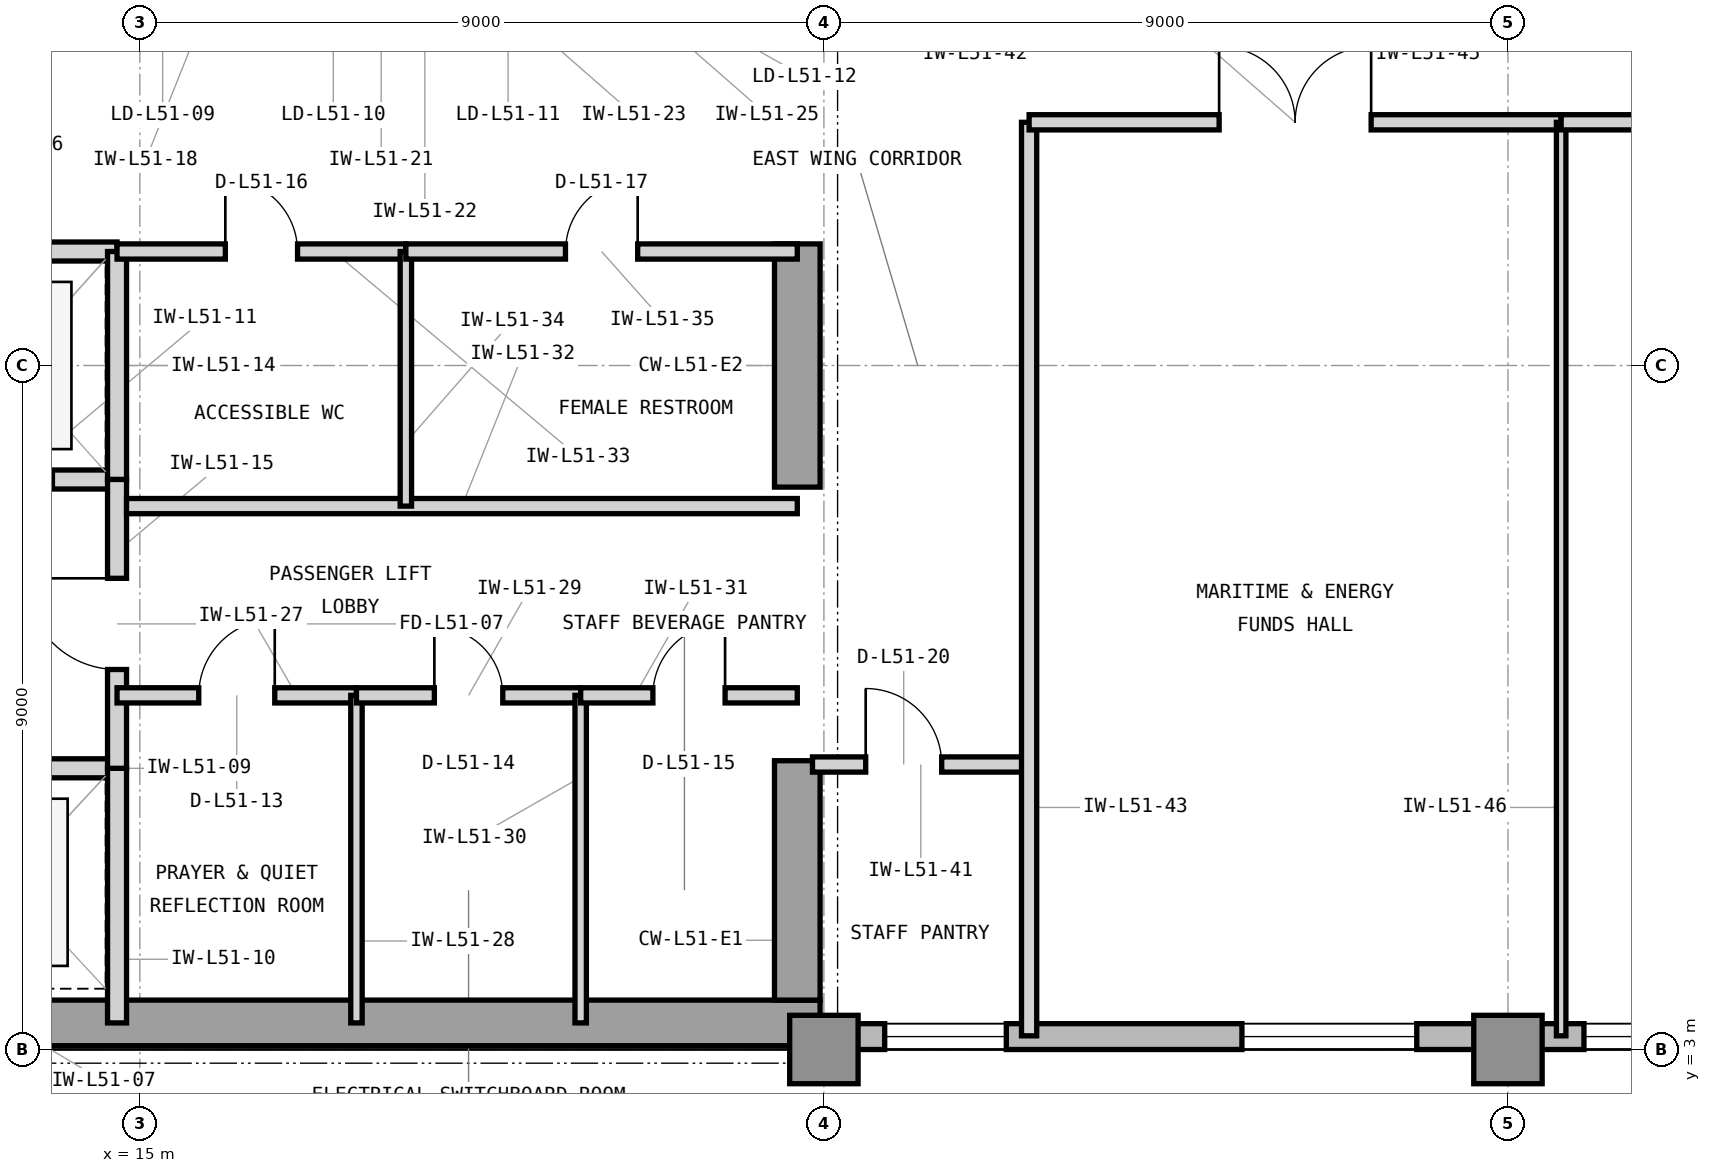
"""IFC4 building model, lengths in metres.
Left out: names, types, materials, properties, quantities, classifications, styles, units other than length and angle.
Written with IfcOpenShell. Run it as: python <this file> out.ifc"""

import sys

from ifc_helpers import new_model, si_unit, direction, frame, frame_2d, origin, origin_2d, place, context, subcontext, project, spatial, rectangle, extrude, element, fill, save


model = new_model("IFC4")
c1 = context("Model", 3, precision=1e-05, world=origin(), true_north=direction((0.0, 1.0)))
c2 = subcontext(c1, "Body", "Model", "MODEL_VIEW")
j1 = project(units=[si_unit("LENGTHUNIT", "METRE"), si_unit("PLANEANGLEUNIT", "RADIAN")], contexts=[c1])
p1 = place(None, origin())
s1 = spatial("IfcSite", under=j1, at=p1, CompositionType="ELEMENT")
p2 = place(p1, origin())
s2 = spatial("IfcBuilding", under=s1, at=p2, CompositionType="ELEMENT")
p3 = place(p2, frame((0.0, 0.0, 211.2)))
s3 = spatial("IfcBuildingStorey", under=s2, at=p3, CompositionType="ELEMENT", Elevation=211.2)
p4 = place(p3, frame((7.475, 3.35, 0.0), z_axis=(0.0, 0.0, 1.0), x_axis=(1.0, 0.0, 0.0)))
e1 = element("IfcWall", 1, at=p4, inside=s3, PredefinedType="SHEAR", context=c2, shape_type="SweptSolid", body=[
    extrude(rectangle(XDim=16.475, YDim=0.6, at=frame_2d((8.237, 0.0))), origin(), (0.0, 0.0, 1.0), 3.9),
])
p5 = place(p3, frame((23.65, 3.65, 0.0), z_axis=(0.0, 0.0, 1.0), x_axis=(0.0, 1.0, 0.0)))
e2 = element("IfcWall", 2, at=p5, inside=s3, PredefinedType="SHEAR", context=c2, shape_type="SweptSolid", body=[
    extrude(rectangle(XDim=3.15, YDim=0.6, at=frame_2d((1.575, 0.0))), origin(), (0.0, 0.0, 1.0), 3.9),
])
p6 = place(p3, frame((23.65, 10.4, 0.0), z_axis=(0.0, 0.0, 1.0), x_axis=(0.0, 1.0, 0.0)))
e3 = element("IfcWall", 3, at=p6, inside=s3, PredefinedType="SHEAR", context=c2, shape_type="SweptSolid", body=[
    extrude(rectangle(XDim=3.2, YDim=0.6, at=frame_2d((1.6, 0.0))), origin(), (0.0, 0.0, 1.0), 3.9),
])
for number, where, z_axis, x_axis in (
    (4, (24.0, 3.0, 0.0), (0.0, 0.0, 1.0), (1.0, 0.0, 0.0)),
    (5, (33.0, 3.0, 0.0), (0.0, 0.0, 1.0), (1.0, 0.0, 0.0)),
):
    element("IfcColumn", number, at=place(p3, frame(where, z_axis=z_axis, x_axis=x_axis)), inside=s3, PredefinedType="COLUMN", context=c2, shape_type="SweptSolid", body=[
        extrude(rectangle(XDim=0.9, YDim=0.9, at=origin_2d()), origin(), (0.0, 0.0, 1.0), 3.9),
    ])
p7 = place(p3, frame((23.9, 3.17, 0.0), z_axis=(0.0, 0.0, 1.0), x_axis=(1.0, 0.0, 0.0)))
e6 = element("IfcWall", 6, at=p7, inside=s3, PredefinedType="STANDARD", context=c2, shape_type="SweptSolid", body=[
    extrude(rectangle(XDim=31.5, YDim=0.34, at=frame_2d((15.75, 0.0))), origin(), (0.0, 0.0, 1.0), 3.7),
])
p8 = place(p7, frame((5.6, 0.0, 0.9)))
e7 = element("IfcOpeningElement", 7, at=p8, cuts=e6, PredefinedType="OPENING", context=c2, shape_type="SweptSolid", body=[
    extrude(rectangle(XDim=2.3, YDim=2.2, at=frame_2d((1.15, 1.1))), frame((0.0, 0.18, 0.0), z_axis=(0.0, -1.0, 0.0), x_axis=(1.0, 0.0, 0.0)), (0.0, 0.0, 1.0), 0.36),
])
p9 = place(p7, frame((10.1, 0.0, 0.9)))
e8 = element("IfcOpeningElement", 8, at=p9, cuts=e6, PredefinedType="OPENING", context=c2, shape_type="SweptSolid", body=[
    extrude(rectangle(XDim=2.3, YDim=2.2, at=frame_2d((1.15, 1.1))), frame((0.0, 0.18, 0.0), z_axis=(0.0, -1.0, 0.0), x_axis=(1.0, 0.0, 0.0)), (0.0, 0.0, 1.0), 0.36),
])
p10 = place(p7, frame((19.1, 0.0, 0.9)))
e9 = element("IfcOpeningElement", 9, at=p10, cuts=e6, PredefinedType="OPENING", context=c2, shape_type="SweptSolid", body=[
    extrude(rectangle(XDim=2.3, YDim=2.2, at=frame_2d((1.15, 1.1))), frame((0.0, 0.18, 0.0), z_axis=(0.0, -1.0, 0.0), x_axis=(1.0, 0.0, 0.0)), (0.0, 0.0, 1.0), 0.36),
])
p11 = place(p7, frame((0.9, 0.0, 0.9)))
e10 = element("IfcOpeningElement", 10, at=p11, cuts=e6, PredefinedType="OPENING", context=c2, shape_type="SweptSolid", body=[
    extrude(rectangle(XDim=1.6, YDim=2.2, at=frame_2d((0.8, 1.1))), frame((0.0, 0.18, 0.0), z_axis=(0.0, -1.0, 0.0), x_axis=(1.0, 0.0, 0.0)), (0.0, 0.0, 1.0), 0.36),
])
p12 = place(p3, frame((11.82, 6.7, 0.0), z_axis=(0.0, 0.0, 1.0), x_axis=(1.0, 0.0, 0.0)))
e11 = element("IfcWall", 11, at=p12, inside=s3, PredefinedType="PARTITIONING", context=c2, shape_type="SweptSolid", body=[
    extrude(rectangle(XDim=2.88, YDim=0.25, at=frame_2d((1.44, 0.0))), origin(), (0.0, 0.0, 1.0), 3.283),
])
p13 = place(p12, frame((0.85, 0.0, 0.0)))
e12 = element("IfcOpeningElement", 12, at=p13, cuts=e11, PredefinedType="OPENING", context=c2, shape_type="SweptSolid", body=[
    extrude(rectangle(XDim=1.1, YDim=2.25, at=frame_2d((0.55, 1.125))), frame((0.0, 0.135, 0.0), z_axis=(0.0, -1.0, 0.0), x_axis=(1.0, 0.0, 0.0)), (0.0, 0.0, 1.0), 0.27),
])
p14 = place(p3, frame((14.7, 3.35, 0.0), z_axis=(0.0, 0.0, 1.0), x_axis=(0.0, 1.0, 0.0)))
e13 = element("IfcWall", 13, at=p14, inside=s3, PredefinedType="PARTITIONING", context=c2, shape_type="SweptSolid", body=[
    extrude(rectangle(XDim=3.35, YDim=0.25, at=frame_2d((1.675, 0.0))), origin(), (0.0, 0.0, 1.0), 3.69),
])
p15 = place(p3, frame((11.95, 10.5, 0.0), z_axis=(0.0, 0.0, 1.0), x_axis=(1.0, 0.0, 0.0)))
e14 = element("IfcWall", 14, at=p15, inside=s3, PredefinedType="PARTITIONING", context=c2, shape_type="SweptSolid", body=[
    extrude(rectangle(XDim=2.75, YDim=0.25, at=frame_2d((1.375, 0.0))), origin(), (0.0, 0.0, 1.0), 3.283),
])
p16 = place(p15, frame((0.8, 0.0, 0.0)))
e15 = element("IfcOpeningElement", 15, at=p16, cuts=e14, PredefinedType="OPENING", context=c2, shape_type="SweptSolid", body=[
    extrude(rectangle(XDim=1.1, YDim=2.25, at=frame_2d((0.55, 1.125))), frame((0.0, 0.135, 0.0), z_axis=(0.0, -1.0, 0.0), x_axis=(1.0, 0.0, 0.0)), (0.0, 0.0, 1.0), 0.27),
])
p17 = place(p3, frame((11.95, 13.5, 0.0), z_axis=(0.0, 0.0, 1.0), x_axis=(1.0, 0.0, 0.0)))
e16 = element("IfcWall", 16, at=p17, inside=s3, PredefinedType="PARTITIONING", context=c2, shape_type="SweptSolid", body=[
    extrude(rectangle(XDim=2.75, YDim=0.25, at=frame_2d((1.375, 0.0))), origin(), (0.0, 0.0, 1.0), 3.283),
])
p18 = place(p3, frame((14.7, 10.5, 0.0), z_axis=(0.0, 0.0, 1.0), x_axis=(0.0, 1.0, 0.0)))
e17 = element("IfcWall", 17, at=p18, inside=s3, PredefinedType="PARTITIONING", context=c2, shape_type="SweptSolid", body=[
    extrude(rectangle(XDim=3.0, YDim=0.25, at=frame_2d((1.5, 0.0))), origin(), (0.0, 0.0, 1.0), 3.69),
])
p19 = place(p3, frame((14.7, 6.7, 0.0), z_axis=(0.0, 0.0, 1.0), x_axis=(0.0, 1.0, 0.0)))
e18 = element("IfcWall", 18, at=p19, inside=s3, PredefinedType="PARTITIONING", context=c2, shape_type="SweptSolid", body=[
    extrude(rectangle(XDim=3.8, YDim=0.25, at=frame_2d((1.9, 0.0))), origin(), (0.0, 0.0, 1.0), 3.69),
])
p20 = place(p19, frame((1.3, 0.0, 0.0)))
e19 = element("IfcOpeningElement", 19, at=p20, cuts=e18, PredefinedType="OPENING", context=c2, shape_type="SweptSolid", body=[
    extrude(rectangle(XDim=1.2, YDim=2.2, at=frame_2d((0.6, 1.1))), frame((0.0, 0.135, 0.0), z_axis=(0.0, -1.0, 0.0), x_axis=(1.0, 0.0, 0.0)), (0.0, 0.0, 1.0), 0.27),
])
p21 = place(p3, frame((14.7, 7.66, 0.0), z_axis=(0.0, 0.0, 1.0), x_axis=(1.0, 0.0, 0.0)))
e20 = element("IfcWall", 20, at=p21, inside=s3, PredefinedType="PARTITIONING", context=c2, shape_type="SweptSolid", body=[
    extrude(rectangle(XDim=3.15, YDim=0.2, at=frame_2d((1.575, 0.0))), origin(), (0.0, 0.0, 1.0), 3.69),
])
p22 = place(p21, frame((1.075, 0.0, 0.0)))
e21 = element("IfcOpeningElement", 21, at=p22, cuts=e20, PredefinedType="OPENING", context=c2, shape_type="SweptSolid", body=[
    extrude(rectangle(XDim=1.0, YDim=2.15, at=frame_2d((0.5, 1.075))), frame((0.0, 0.11, 0.0), z_axis=(0.0, -1.0, 0.0), x_axis=(1.0, 0.0, 0.0)), (0.0, 0.0, 1.0), 0.22),
])
p23 = place(p3, frame((17.85, 3.35, 0.0), z_axis=(0.0, 0.0, 1.0), x_axis=(0.0, 1.0, 0.0)))
e22 = element("IfcWall", 22, at=p23, inside=s3, PredefinedType="PARTITIONING", context=c2, shape_type="SweptSolid", body=[
    extrude(rectangle(XDim=4.31, YDim=0.15, at=frame_2d((2.155, 0.0))), origin(), (0.0, 0.0, 1.0), 3.69),
])
p24 = place(p3, frame((17.85, 7.66, 0.0), z_axis=(0.0, 0.0, 1.0), x_axis=(1.0, 0.0, 0.0)))
e23 = element("IfcWall", 23, at=p24, inside=s3, PredefinedType="PARTITIONING", context=c2, shape_type="SweptSolid", body=[
    extrude(rectangle(XDim=2.95, YDim=0.2, at=frame_2d((1.475, 0.0))), origin(), (0.0, 0.0, 1.0), 3.69),
])
p25 = place(p24, frame((1.025, 0.0, 0.0)))
e24 = element("IfcOpeningElement", 24, at=p25, cuts=e23, PredefinedType="OPENING", context=c2, shape_type="SweptSolid", body=[
    extrude(rectangle(XDim=0.9, YDim=2.1, at=frame_2d((0.45, 1.05))), frame((0.0, 0.11, 0.0), z_axis=(0.0, -1.0, 0.0), x_axis=(1.0, 0.0, 0.0)), (0.0, 0.0, 1.0), 0.22),
])
p26 = place(p3, frame((20.8, 3.35, 0.0), z_axis=(0.0, 0.0, 1.0), x_axis=(0.0, 1.0, 0.0)))
e25 = element("IfcWall", 25, at=p26, inside=s3, PredefinedType="PARTITIONING", context=c2, shape_type="SweptSolid", body=[
    extrude(rectangle(XDim=4.31, YDim=0.15, at=frame_2d((2.155, 0.0))), origin(), (0.0, 0.0, 1.0), 3.69),
])
p27 = place(p3, frame((20.8, 7.66, 0.0), z_axis=(0.0, 0.0, 1.0), x_axis=(1.0, 0.0, 0.0)))
e26 = element("IfcWall", 26, at=p27, inside=s3, PredefinedType="PARTITIONING", context=c2, shape_type="SweptSolid", body=[
    extrude(rectangle(XDim=2.85, YDim=0.2, at=frame_2d((1.425, 0.0))), origin(), (0.0, 0.0, 1.0), 3.69),
])
p28 = place(p27, frame((0.95, 0.0, 0.0)))
e27 = element("IfcOpeningElement", 27, at=p28, cuts=e26, PredefinedType="OPENING", context=c2, shape_type="SweptSolid", body=[
    extrude(rectangle(XDim=0.95, YDim=2.1, at=frame_2d((0.475, 1.05))), frame((0.0, 0.11, 0.0), z_axis=(0.0, -1.0, 0.0), x_axis=(1.0, 0.0, 0.0)), (0.0, 0.0, 1.0), 0.22),
])
p29 = place(p3, frame((14.825, 10.15, 0.0), z_axis=(0.0, 0.0, 1.0), x_axis=(1.0, 0.0, 0.0)))
e28 = element("IfcWall", 28, at=p29, inside=s3, PredefinedType="PARTITIONING", context=c2, shape_type="SweptSolid", body=[
    extrude(rectangle(XDim=8.825, YDim=0.2, at=frame_2d((4.413, 0.0))), origin(), (0.0, 0.0, 1.0), 3.69),
])
p30 = place(p3, frame((14.7, 13.5, 0.0), z_axis=(0.0, 0.0, 1.0), x_axis=(1.0, 0.0, 0.0)))
e29 = element("IfcWall", 29, at=p30, inside=s3, PredefinedType="PARTITIONING", context=c2, shape_type="SweptSolid", body=[
    extrude(rectangle(XDim=3.8, YDim=0.2, at=frame_2d((1.9, 0.0))), origin(), (0.0, 0.0, 1.0), 3.283),
])
p31 = place(p30, frame((1.425, 0.0, 0.0)))
e30 = element("IfcOpeningElement", 30, at=p31, cuts=e29, PredefinedType="OPENING", context=c2, shape_type="SweptSolid", body=[
    extrude(rectangle(XDim=0.95, YDim=2.1, at=frame_2d((0.475, 1.05))), frame((0.0, 0.11, 0.0), z_axis=(0.0, -1.0, 0.0), x_axis=(1.0, 0.0, 0.0)), (0.0, 0.0, 1.0), 0.22),
])
p32 = place(p3, frame((18.5, 10.15, 0.0), z_axis=(0.0, 0.0, 1.0), x_axis=(0.0, 1.0, 0.0)))
e31 = element("IfcWall", 31, at=p32, inside=s3, PredefinedType="PARTITIONING", context=c2, shape_type="SweptSolid", body=[
    extrude(rectangle(XDim=3.35, YDim=0.15, at=frame_2d((1.675, 0.0))), origin(), (0.0, 0.0, 1.0), 3.69),
])
p33 = place(p3, frame((18.5, 13.5, 0.0), z_axis=(0.0, 0.0, 1.0), x_axis=(1.0, 0.0, 0.0)))
e32 = element("IfcWall", 32, at=p33, inside=s3, PredefinedType="PARTITIONING", context=c2, shape_type="SweptSolid", body=[
    extrude(rectangle(XDim=5.15, YDim=0.2, at=frame_2d((2.575, 0.0))), origin(), (0.0, 0.0, 1.0), 3.283),
])
p34 = place(p33, frame((2.1, 0.0, 0.0)))
e33 = element("IfcOpeningElement", 33, at=p34, cuts=e32, PredefinedType="OPENING", context=c2, shape_type="SweptSolid", body=[
    extrude(rectangle(XDim=0.95, YDim=2.1, at=frame_2d((0.475, 1.05))), frame((0.0, 0.11, 0.0), z_axis=(0.0, -1.0, 0.0), x_axis=(1.0, 0.0, 0.0)), (0.0, 0.0, 1.0), 0.22),
])
p35 = place(p3, frame((23.85, 6.75, 0.0), z_axis=(0.0, 0.0, 1.0), x_axis=(1.0, 0.0, 0.0)))
e34 = element("IfcWall", 34, at=p35, inside=s3, PredefinedType="PARTITIONING", context=c2, shape_type="SweptSolid", body=[
    extrude(rectangle(XDim=2.85, YDim=0.2, at=frame_2d((1.425, 0.0))), origin(), (0.0, 0.0, 1.0), 3.69),
])
p36 = place(p35, frame((0.7, 0.0, 0.0)))
e35 = element("IfcOpeningElement", 35, at=p36, cuts=e34, PredefinedType="OPENING", context=c2, shape_type="SweptSolid", body=[
    extrude(rectangle(XDim=1.0, YDim=2.15, at=frame_2d((0.5, 1.075))), frame((0.0, 0.11, 0.0), z_axis=(0.0, -1.0, 0.0), x_axis=(1.0, 0.0, 0.0)), (0.0, 0.0, 1.0), 0.22),
])
p37 = place(p3, frame((26.7, 3.18, 0.0), z_axis=(0.0, 0.0, 1.0), x_axis=(0.0, 1.0, 0.0)))
e36 = element("IfcWall", 36, at=p37, inside=s3, PredefinedType="PARTITIONING", context=c2, shape_type="SweptSolid", body=[
    extrude(rectangle(XDim=12.02, YDim=0.2, at=frame_2d((6.01, 0.0))), origin(), (0.0, 0.0, 1.0), 3.69),
])
p38 = place(p3, frame((26.7, 15.2, 0.0), z_axis=(0.0, 0.0, 1.0), x_axis=(1.0, 0.0, 0.0)))
e37 = element("IfcWall", 37, at=p38, inside=s3, PredefinedType="PARTITIONING", context=c2, shape_type="SweptSolid", body=[
    extrude(rectangle(XDim=7.0, YDim=0.2, at=frame_2d((3.5, 0.0))), origin(), (0.0, 0.0, 1.0), 3.69),
])
p39 = place(p38, frame((2.5, 0.0, 0.0)))
e38 = element("IfcOpeningElement", 38, at=p39, cuts=e37, PredefinedType="OPENING", context=c2, shape_type="SweptSolid", body=[
    extrude(rectangle(XDim=2.0, YDim=2.5, at=frame_2d((1.0, 1.25))), frame((0.0, 0.11, 0.0), z_axis=(0.0, -1.0, 0.0), x_axis=(1.0, 0.0, 0.0)), (0.0, 0.0, 1.0), 0.22),
])
p40 = place(p3, frame((33.7, 3.18, 0.0), z_axis=(0.0, 0.0, 1.0), x_axis=(0.0, 1.0, 0.0)))
e39 = element("IfcWall", 39, at=p40, inside=s3, PredefinedType="PARTITIONING", context=c2, shape_type="SweptSolid", body=[
    extrude(rectangle(XDim=12.02, YDim=0.125, at=frame_2d((6.01, 0.0))), origin(), (0.0, 0.0, 1.0), 3.69),
])
p41 = place(p3, frame((33.7, 15.2, 0.0), z_axis=(0.0, 0.0, 1.0), x_axis=(1.0, 0.0, 0.0)))
e40 = element("IfcWall", 40, at=p41, inside=s3, PredefinedType="PARTITIONING", context=c2, shape_type="SweptSolid", body=[
    extrude(rectangle(XDim=7.0, YDim=0.2, at=frame_2d((3.5, 0.0))), origin(), (0.0, 0.0, 1.0), 3.69),
])
p42 = place(p41, frame((3.0, 0.0, 0.0)))
e41 = element("IfcOpeningElement", 41, at=p42, cuts=e40, PredefinedType="OPENING", context=c2, shape_type="SweptSolid", body=[
    extrude(rectangle(XDim=1.0, YDim=2.15, at=frame_2d((0.5, 1.075))), frame((0.0, 0.11, 0.0), z_axis=(0.0, -1.0, 0.0), x_axis=(1.0, 0.0, 0.0)), (0.0, 0.0, 1.0), 0.22),
])
p43 = place(p8, origin())
e42 = element("IfcWindow", 42, at=p43, inside=s3, PartitioningType="SINGLE_PANEL", PredefinedType="WINDOW", context=c2, shape_type="SweptSolid", body=[
    extrude(rectangle(XDim=2.3, YDim=2.2, at=frame_2d((1.15, 1.1))), frame((0.0, 0.11, 0.0), z_axis=(0.0, -1.0, 0.0), x_axis=(1.0, 0.0, 0.0)), (0.0, 0.0, 1.0), 0.06),
])
fill(e7, e42)
p44 = place(p9, origin())
e43 = element("IfcWindow", 43, at=p44, inside=s3, PartitioningType="SINGLE_PANEL", PredefinedType="WINDOW", context=c2, shape_type="SweptSolid", body=[
    extrude(rectangle(XDim=2.3, YDim=2.2, at=frame_2d((1.15, 1.1))), frame((0.0, 0.11, 0.0), z_axis=(0.0, -1.0, 0.0), x_axis=(1.0, 0.0, 0.0)), (0.0, 0.0, 1.0), 0.06),
])
fill(e8, e43)
p45 = place(p20, origin())
e44 = element("IfcDoor", 44, at=p45, inside=s3, OperationType="SINGLE_SWING_RIGHT", PredefinedType="DOOR", context=c2, shape_type="SweptSolid", body=[
    extrude(rectangle(XDim=1.2, YDim=2.2, at=frame_2d((0.6, 1.1))), frame((0.0, 0.025, 0.0), z_axis=(0.0, -1.0, 0.0), x_axis=(1.0, 0.0, 0.0)), (0.0, 0.0, 1.0), 0.05),
])
fill(e19, e44)
p46 = place(p22, origin())
e45 = element("IfcDoor", 45, at=p46, inside=s3, OperationType="SINGLE_SWING_RIGHT", PredefinedType="DOOR", context=c2, shape_type="SweptSolid", body=[
    extrude(rectangle(XDim=1.0, YDim=2.15, at=frame_2d((0.5, 1.075))), frame((0.0, 0.025, 0.0), z_axis=(0.0, -1.0, 0.0), x_axis=(1.0, 0.0, 0.0)), (0.0, 0.0, 1.0), 0.05),
])
fill(e21, e45)
p47 = place(p25, origin())
e46 = element("IfcDoor", 46, at=p47, inside=s3, OperationType="SINGLE_SWING_LEFT", PredefinedType="TRAPDOOR", context=c2, shape_type="SweptSolid", body=[
    extrude(rectangle(XDim=0.9, YDim=2.1, at=frame_2d((0.45, 1.05))), frame((0.0, 0.025, 0.0), z_axis=(0.0, -1.0, 0.0), x_axis=(1.0, 0.0, 0.0)), (0.0, 0.0, 1.0), 0.05),
])
fill(e24, e46)
p48 = place(p28, origin())
e47 = element("IfcDoor", 47, at=p48, inside=s3, OperationType="SINGLE_SWING_RIGHT", PredefinedType="DOOR", context=c2, shape_type="SweptSolid", body=[
    extrude(rectangle(XDim=0.95, YDim=2.1, at=frame_2d((0.475, 1.05))), frame((0.0, 0.025, 0.0), z_axis=(0.0, -1.0, 0.0), x_axis=(1.0, 0.0, 0.0)), (0.0, 0.0, 1.0), 0.05),
])
fill(e27, e47)
p49 = place(p31, origin())
e48 = element("IfcDoor", 48, at=p49, inside=s3, OperationType="SINGLE_SWING_LEFT", PredefinedType="DOOR", context=c2, shape_type="SweptSolid", body=[
    extrude(rectangle(XDim=0.95, YDim=2.1, at=frame_2d((0.475, 1.05))), frame((0.0, 0.025, 0.0), z_axis=(0.0, -1.0, 0.0), x_axis=(1.0, 0.0, 0.0)), (0.0, 0.0, 1.0), 0.05),
])
fill(e30, e48)
p50 = place(p34, origin())
e49 = element("IfcDoor", 49, at=p50, inside=s3, OperationType="SINGLE_SWING_RIGHT", PredefinedType="DOOR", context=c2, shape_type="SweptSolid", body=[
    extrude(rectangle(XDim=0.95, YDim=2.1, at=frame_2d((0.475, 1.05))), frame((0.0, 0.025, 0.0), z_axis=(0.0, -1.0, 0.0), x_axis=(1.0, 0.0, 0.0)), (0.0, 0.0, 1.0), 0.05),
])
fill(e33, e49)
p51 = place(p36, origin())
e50 = element("IfcDoor", 50, at=p51, inside=s3, OperationType="SINGLE_SWING_LEFT", PredefinedType="DOOR", context=c2, shape_type="SweptSolid", body=[
    extrude(rectangle(XDim=1.0, YDim=2.15, at=frame_2d((0.5, 1.075))), frame((0.0, 0.025, 0.0), z_axis=(0.0, -1.0, 0.0), x_axis=(1.0, 0.0, 0.0)), (0.0, 0.0, 1.0), 0.05),
])
fill(e35, e50)
p52 = place(p39, origin())
e51 = element("IfcDoor", 51, at=p52, inside=s3, OperationType="DOUBLE_DOOR_SINGLE_SWING", PredefinedType="DOOR", context=c2, shape_type="SweptSolid", body=[
    extrude(rectangle(XDim=2.0, YDim=2.5, at=frame_2d((1.0, 1.25))), frame((0.0, 0.025, 0.0), z_axis=(0.0, -1.0, 0.0), x_axis=(1.0, 0.0, 0.0)), (0.0, 0.0, 1.0), 0.05),
])
fill(e38, e51)
p53 = place(p11, origin())
e52 = element("IfcWindow", 52, at=p53, inside=s3, PartitioningType="SINGLE_PANEL", PredefinedType="WINDOW", context=c2, shape_type="SweptSolid", body=[
    extrude(rectangle(XDim=1.6, YDim=2.2, at=frame_2d((0.8, 1.1))), frame((0.0, 0.11, 0.0), z_axis=(0.0, -1.0, 0.0), x_axis=(1.0, 0.0, 0.0)), (0.0, 0.0, 1.0), 0.06),
])
fill(e10, e52)
save(model, sys.argv[1])
